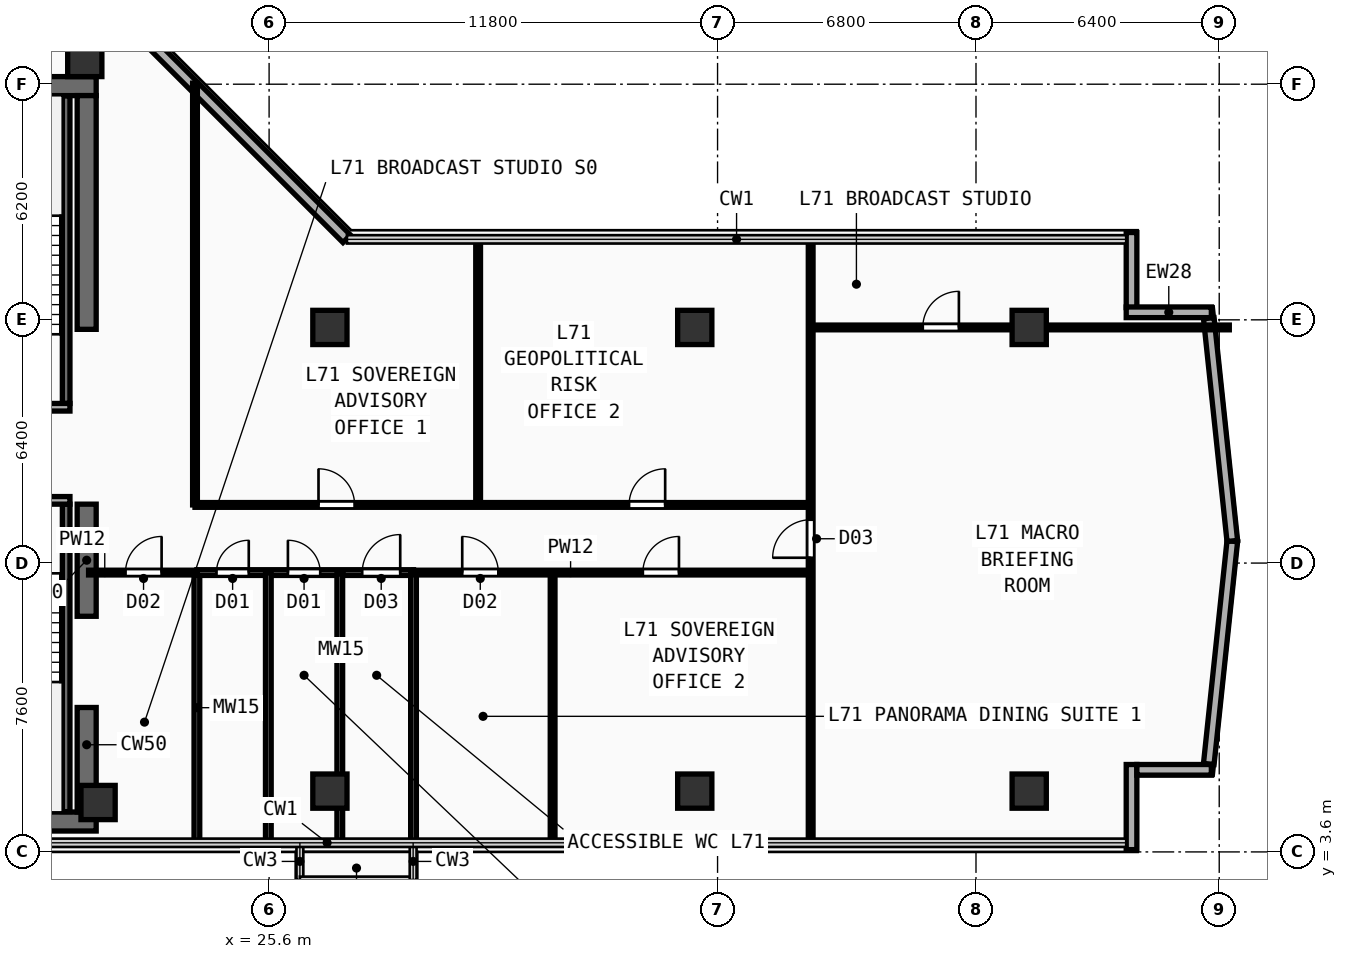
"""IFC4 building model, lengths in metres.
Left out: names, types, materials, properties, quantities, classifications, styles, units other than length and angle.
Written with IfcOpenShell. Run it as: python <this file> out.ifc"""

import sys

from ifc_helpers import new_model, si_unit, direction, frame, frame_2d, origin, origin_2d, place, context, subcontext, project, spatial, rectangle, extrude, element, fill, save


model = new_model("IFC4")
c1 = context("Model", 3, precision=1e-05, world=origin(), true_north=direction((0.0, 1.0)))
c2 = subcontext(c1, "Body", "Model", "MODEL_VIEW")
j1 = project(units=[si_unit("LENGTHUNIT", "METRE"), si_unit("PLANEANGLEUNIT", "RADIAN")], contexts=[c1])
p1 = place(None, origin())
s1 = spatial("IfcSite", under=j1, at=p1, CompositionType="ELEMENT")
p2 = place(p1, origin())
s2 = spatial("IfcBuilding", under=s1, at=p2, CompositionType="ELEMENT")
p3 = place(p2, frame((0.0, 0.0, 278.0)))
s3 = spatial("IfcBuildingStorey", under=s2, at=p3, CompositionType="ELEMENT", Elevation=278.0)
for number, where, z_axis, x_axis in (
    (1, (7.2, 4.4, 0.0), (0.0, 0.0, 1.0), (1.0, 0.0, 0.0)),
    (2, (7.2, 23.75, 0.0), (0.0, 0.0, 1.0), (1.0, 0.0, 0.0)),
):
    element("IfcWall", number, at=place(p3, frame(where, z_axis=z_axis, x_axis=x_axis)), inside=s3, PredefinedType="SHEAR", context=c2, shape_type="SweptSolid", body=[
        extrude(rectangle(XDim=13.85, YDim=0.5, at=frame_2d((6.925, 0.0))), origin(), (0.0, 0.0, 1.0), 3.56),
    ])
p4 = place(p3, frame((20.8, 4.65, 0.0), z_axis=(0.0, 0.0, 1.0), x_axis=(0.0, 1.0, 0.0)))
e3 = element("IfcWall", 3, at=p4, inside=s3, PredefinedType="SHEAR", context=c2, shape_type="SweptSolid", body=[
    extrude(rectangle(XDim=2.75, YDim=0.5, at=frame_2d((1.375, 0.0))), origin(), (0.0, 0.0, 1.0), 3.56),
])
p5 = place(p3, frame((20.8, 9.8, 0.0), z_axis=(0.0, 0.0, 1.0), x_axis=(0.0, 1.0, 0.0)))
e4 = element("IfcWall", 4, at=p5, inside=s3, PredefinedType="SHEAR", context=c2, shape_type="SweptSolid", body=[
    extrude(rectangle(XDim=2.95, YDim=0.5, at=frame_2d((1.475, 0.0))), origin(), (0.0, 0.0, 1.0), 3.56),
])
p6 = place(p3, frame((20.8, 17.35, 0.0), z_axis=(0.0, 0.0, 1.0), x_axis=(0.0, 1.0, 0.0)))
e5 = element("IfcWall", 5, at=p6, inside=s3, PredefinedType="SHEAR", context=c2, shape_type="SweptSolid", body=[
    extrude(rectangle(XDim=6.15, YDim=0.5, at=frame_2d((3.075, 0.0))), origin(), (0.0, 0.0, 1.0), 3.56),
])
for number, where, z_axis, x_axis in (
    (6, (21.1, 4.9, 0.0), (0.0, 0.0, 1.0), (1.0, 0.0, 0.0)),
    (7, (20.75, 24.45, 0.0), (0.0, 0.0, 1.0), (1.0, 0.0, 0.0)),
    (8, (27.2, 5.2, 0.0), (0.0, 0.0, 1.0), (1.0, 0.0, 0.0)),
    (9, (36.8, 5.2, 0.0), (0.0, 0.0, 1.0), (1.0, 0.0, 0.0)),
    (10, (45.6, 5.2, 0.0), (0.0, 0.0, 1.0), (1.0, 0.0, 0.0)),
    (11, (27.2, 17.4, 0.0), (0.0, 0.0, 1.0), (1.0, 0.0, 0.0)),
    (12, (36.8, 17.4, 0.0), (0.0, 0.0, 1.0), (1.0, 0.0, 0.0)),
    (13, (45.6, 17.4, 0.0), (0.0, 0.0, 1.0), (1.0, 0.0, 0.0)),
):
    element("IfcColumn", number, at=place(p3, frame(where, z_axis=z_axis, x_axis=x_axis)), inside=s3, PredefinedType="COLUMN", context=c2, shape_type="SweptSolid", body=[
        extrude(rectangle(XDim=0.9, YDim=0.9, at=origin_2d()), origin(), (0.0, 0.0, 1.0), 3.56),
    ])
p7 = place(p3, frame((48.292, 3.66, 0.0), z_axis=(0.0, 0.0, 1.0), x_axis=(0.0, 1.0, 0.0)))
e14 = element("IfcWall", 14, at=p7, inside=s3, PredefinedType="SOLIDWALL", context=c2, shape_type="SweptSolid", body=[
    extrude(rectangle(XDim=2.24, YDim=0.28, at=frame_2d((1.12, 0.0))), origin(), (0.0, 0.0, 1.0), 3.56),
])
p8 = place(p3, frame((48.433, 5.76, 0.0), z_axis=(0.0, 0.0, 1.0), x_axis=(1.0, 0.0, 0.0)))
e15 = element("IfcWall", 15, at=p8, inside=s3, PredefinedType="SOLIDWALL", context=c2, shape_type="SweptSolid", body=[
    extrude(rectangle(XDim=1.96, YDim=0.28, at=frame_2d((0.98, 0.0))), origin(), (0.0, 0.0, 1.0), 3.56),
])
p9 = place(p3, frame((48.292, 17.923, 0.0), z_axis=(0.0, 0.0, 1.0), x_axis=(0.0, 1.0, 0.0)))
e16 = element("IfcWall", 16, at=p9, inside=s3, PredefinedType="SOLIDWALL", context=c2, shape_type="SweptSolid", body=[
    extrude(rectangle(XDim=1.975, YDim=0.28, at=frame_2d((0.988, 0.0))), origin(), (0.0, 0.0, 1.0), 3.56),
])
p10 = place(p3, frame((48.153, 17.798, 0.0), z_axis=(0.0, 0.0, 1.0), x_axis=(1.0, 0.0, 0.0)))
e17 = element("IfcWall", 17, at=p10, inside=s3, PredefinedType="SOLIDWALL", context=c2, shape_type="SweptSolid", body=[
    extrude(rectangle(XDim=2.24, YDim=0.28, at=frame_2d((1.12, 0.0))), origin(), (0.0, 0.0, 1.0), 3.56),
])
p11 = place(p3, frame((27.643, 19.733, 0.0), z_axis=(0.0, 0.0, 1.0), x_axis=(-0.707106781187, 0.707106781187, 0.0)))
e18 = element("IfcWall", 18, at=p11, inside=s3, PredefinedType="SOLIDWALL", context=c2, shape_type="SweptSolid", body=[
    extrude(rectangle(XDim=9.207, YDim=0.28, at=frame_2d((4.603, 0.0))), origin(), (0.0, 0.0, 1.0), 3.56),
])
for number, where, z_axis, x_axis in (
    (19, (50.325, 5.915, 0.0), (0.0, 0.0, 1.0), (0.105, 0.994, 0.0)),
    (20, (50.944, 11.782, 0.0), (0.0, 0.0, 1.0), (-0.105, 0.994, 0.0)),
):
    element("IfcWall", number, at=place(p3, frame(where, z_axis=z_axis, x_axis=x_axis)), inside=s3, PredefinedType="SOLIDWALL", context=c2, shape_type="SweptSolid", body=[
        extrude(rectangle(XDim=5.894, YDim=0.28, at=frame_2d((2.947, 0.0))), origin(), (0.0, 0.0, 1.0), 3.56),
    ])
p12 = place(p3, frame((20.26, 4.66, 0.0), z_axis=(0.0, 0.0, 1.0), x_axis=(0.0, 1.0, 0.0)))
e21 = element("IfcWall", 21, at=p12, inside=s3, PredefinedType="SHEAR", context=c2, shape_type="SweptSolid", body=[
    extrude(rectangle(XDim=8.09, YDim=0.2, at=frame_2d((4.045, 0.0))), origin(), (0.0, 0.0, 1.0), 3.56),
])
p13 = place(p3, frame((16.4, 12.85, 0.0), z_axis=(0.0, 0.0, 1.0), x_axis=(1.0, 0.0, 0.0)))
e22 = element("IfcWall", 22, at=p13, inside=s3, PredefinedType="PARTITIONING", context=c2, shape_type="SweptSolid", body=[
    extrude(rectangle(XDim=3.96, YDim=0.2, at=frame_2d((1.98, 0.0))), origin(), (0.0, 0.0, 1.0), 3.56),
])
p14 = place(p13, frame((1.304, 0.0, 0.0)))
e23 = element("IfcOpeningElement", 23, at=p14, cuts=e22, PredefinedType="OPENING", context=c2, shape_type="SweptSolid", body=[
    extrude(rectangle(XDim=1.1, YDim=2.2, at=frame_2d((0.55, 1.1))), frame((0.0, 0.11, 0.0), z_axis=(0.0, -1.0, 0.0), x_axis=(1.0, 0.0, 0.0)), (0.0, 0.0, 1.0), 0.22),
])
p15 = place(p3, frame((20.26, 15.4, 0.0), z_axis=(0.0, 0.0, 1.0), x_axis=(0.0, 1.0, 0.0)))
e24 = element("IfcWall", 24, at=p15, inside=s3, PredefinedType="SHEAR", context=c2, shape_type="SweptSolid", body=[
    extrude(rectangle(XDim=8.09, YDim=0.2, at=frame_2d((4.045, 0.0))), origin(), (0.0, 0.0, 1.0), 3.56),
])
p16 = place(p3, frame((16.41, 15.3, 0.0), z_axis=(0.0, 0.0, 1.0), x_axis=(1.0, 0.0, 0.0)))
e25 = element("IfcWall", 25, at=p16, inside=s3, PredefinedType="PARTITIONING", context=c2, shape_type="SweptSolid", body=[
    extrude(rectangle(XDim=3.95, YDim=0.2, at=frame_2d((1.975, 0.0))), origin(), (0.0, 0.0, 1.0), 3.56),
])
p17 = place(p16, frame((1.294, 0.0, 0.0)))
e26 = element("IfcOpeningElement", 26, at=p17, cuts=e25, PredefinedType="OPENING", context=c2, shape_type="SweptSolid", body=[
    extrude(rectangle(XDim=1.1, YDim=2.2, at=frame_2d((0.55, 1.1))), frame((0.0, 0.11, 0.0), z_axis=(0.0, -1.0, 0.0), x_axis=(1.0, 0.0, 0.0)), (0.0, 0.0, 1.0), 0.22),
])
p18 = place(p3, frame((23.7, 3.84, 0.0), z_axis=(0.0, 0.0, 1.0), x_axis=(0.0, 1.0, 0.0)))
e27 = element("IfcWall", 27, at=p18, inside=s3, PredefinedType="PLUMBINGWALL", context=c2, shape_type="SweptSolid", body=[
    extrude(rectangle(XDim=7.11, YDim=0.15, at=frame_2d((3.555, 0.0))), origin(), (0.0, 0.0, 1.0), 3.56),
])
p19 = place(p3, frame((23.7, 10.95, 0.0), z_axis=(0.0, 0.0, 1.0), x_axis=(1.0, 0.0, 0.0)))
e28 = element("IfcWall", 28, at=p19, inside=s3, PredefinedType="PLUMBINGWALL", context=c2, shape_type="SweptSolid", body=[
    extrude(rectangle(XDim=5.7, YDim=0.15, at=frame_2d((2.85, 0.0))), origin(), (0.0, 0.0, 1.0), 3.56),
])
p20 = place(p19, frame((0.515, 0.0, 0.0)))
e29 = element("IfcOpeningElement", 29, at=p20, cuts=e28, PredefinedType="OPENING", context=c2, shape_type="SweptSolid", body=[
    extrude(rectangle(XDim=0.85, YDim=2.15, at=frame_2d((0.425, 1.075))), frame((0.0, 0.085, 0.0), z_axis=(0.0, -1.0, 0.0), x_axis=(1.0, 0.0, 0.0)), (0.0, 0.0, 1.0), 0.17),
])
p21 = place(p19, frame((2.395, 0.0, 0.0)))
e30 = element("IfcOpeningElement", 30, at=p21, cuts=e28, PredefinedType="OPENING", context=c2, shape_type="SweptSolid", body=[
    extrude(rectangle(XDim=0.85, YDim=2.15, at=frame_2d((0.425, 1.075))), frame((0.0, 0.085, 0.0), z_axis=(0.0, -1.0, 0.0), x_axis=(1.0, 0.0, 0.0)), (0.0, 0.0, 1.0), 0.17),
])
p22 = place(p19, frame((4.35, 0.0, 0.0)))
e31 = element("IfcOpeningElement", 31, at=p22, cuts=e28, PredefinedType="OPENING", context=c2, shape_type="SweptSolid", body=[
    extrude(rectangle(XDim=1.0, YDim=2.2, at=frame_2d((0.5, 1.1))), frame((0.0, 0.085, 0.0), z_axis=(0.0, -1.0, 0.0), x_axis=(1.0, 0.0, 0.0)), (0.0, 0.0, 1.0), 0.17),
])
p23 = place(p3, frame((25.58, 3.84, 0.0), z_axis=(0.0, 0.0, 1.0), x_axis=(0.0, 1.0, 0.0)))
e32 = element("IfcWall", 32, at=p23, inside=s3, PredefinedType="PLUMBINGWALL", context=c2, shape_type="SweptSolid", body=[
    extrude(rectangle(XDim=7.11, YDim=0.15, at=frame_2d((3.555, 0.0))), origin(), (0.0, 0.0, 1.0), 3.56),
])
p24 = place(p3, frame((27.46, 3.84, 0.0), z_axis=(0.0, 0.0, 1.0), x_axis=(0.0, 1.0, 0.0)))
e33 = element("IfcWall", 33, at=p24, inside=s3, PredefinedType="PLUMBINGWALL", context=c2, shape_type="SweptSolid", body=[
    extrude(rectangle(XDim=7.11, YDim=0.15, at=frame_2d((3.555, 0.0))), origin(), (0.0, 0.0, 1.0), 2.798),
])
p25 = place(p3, frame((29.4, 3.84, 0.0), z_axis=(0.0, 0.0, 1.0), x_axis=(0.0, 1.0, 0.0)))
e34 = element("IfcWall", 34, at=p25, inside=s3, PredefinedType="PLUMBINGWALL", context=c2, shape_type="SweptSolid", body=[
    extrude(rectangle(XDim=7.11, YDim=0.15, at=frame_2d((3.555, 0.0))), origin(), (0.0, 0.0, 1.0), 3.56),
])
p26 = place(p3, frame((20.85, 10.95, 0.0), z_axis=(0.0, 0.0, 1.0), x_axis=(1.0, 0.0, 0.0)))
e35 = element("IfcWall", 35, at=p26, inside=s3, PredefinedType="PARTITIONING", context=c2, shape_type="SweptSolid", body=[
    extrude(rectangle(XDim=2.85, YDim=0.125, at=frame_2d((1.425, 0.0))), origin(), (0.0, 0.0, 1.0), 3.56),
])
p27 = place(p26, frame((0.971, 0.0, 0.0)))
e36 = element("IfcOpeningElement", 36, at=p27, cuts=e35, PredefinedType="OPENING", context=c2, shape_type="SweptSolid", body=[
    extrude(rectangle(XDim=0.95, YDim=2.15, at=frame_2d((0.475, 1.075))), frame((0.0, 0.073, 0.0), z_axis=(0.0, -1.0, 0.0), x_axis=(1.0, 0.0, 0.0)), (0.0, 0.0, 1.0), 0.145),
])
p28 = place(p3, frame((29.4, 10.95, 0.0), z_axis=(0.0, 0.0, 1.0), x_axis=(1.0, 0.0, 0.0)))
e37 = element("IfcWall", 37, at=p28, inside=s3, PredefinedType="PARTITIONING", context=c2, shape_type="SweptSolid", body=[
    extrude(rectangle(XDim=10.45, YDim=0.125, at=frame_2d((5.225, 0.0))), origin(), (0.0, 0.0, 1.0), 3.56),
])
p29 = place(p28, frame((1.281, 0.0, 0.0)))
e38 = element("IfcOpeningElement", 38, at=p29, cuts=e37, PredefinedType="OPENING", context=c2, shape_type="SweptSolid", body=[
    extrude(rectangle(XDim=0.95, YDim=2.15, at=frame_2d((0.475, 1.075))), frame((0.0, 0.073, 0.0), z_axis=(0.0, -1.0, 0.0), x_axis=(1.0, 0.0, 0.0)), (0.0, 0.0, 1.0), 0.145),
])
p30 = place(p28, frame((6.034, 0.0, 0.0)))
e39 = element("IfcOpeningElement", 39, at=p30, cuts=e37, PredefinedType="OPENING", context=c2, shape_type="SweptSolid", body=[
    extrude(rectangle(XDim=0.95, YDim=2.15, at=frame_2d((0.475, 1.075))), frame((0.0, 0.073, 0.0), z_axis=(0.0, -1.0, 0.0), x_axis=(1.0, 0.0, 0.0)), (0.0, 0.0, 1.0), 0.145),
])
p31 = place(p3, frame((33.06, 3.84, 0.0), z_axis=(0.0, 0.0, 1.0), x_axis=(0.0, 1.0, 0.0)))
e40 = element("IfcWall", 40, at=p31, inside=s3, PredefinedType="PARTITIONING", context=c2, shape_type="SweptSolid", body=[
    extrude(rectangle(XDim=7.11, YDim=0.125, at=frame_2d((3.555, 0.0))), origin(), (0.0, 0.0, 1.0), 3.56),
])
p32 = place(p3, frame((39.85, 3.84, 0.0), z_axis=(0.0, 0.0, 1.0), x_axis=(0.0, 1.0, 0.0)))
e41 = element("IfcWall", 41, at=p32, inside=s3, PredefinedType="PARTITIONING", context=c2, shape_type="SweptSolid", body=[
    extrude(rectangle(XDim=15.92, YDim=0.125, at=frame_2d((7.96, 0.0))), origin(), (0.0, 0.0, 1.0), 3.56),
])
p33 = place(p32, frame((7.5, 0.0, 0.0)))
e42 = element("IfcOpeningElement", 42, at=p33, cuts=e41, PredefinedType="OPENING", context=c2, shape_type="SweptSolid", body=[
    extrude(rectangle(XDim=1.0, YDim=2.2, at=frame_2d((0.5, 1.1))), frame((0.0, 0.073, 0.0), z_axis=(0.0, -1.0, 0.0), x_axis=(1.0, 0.0, 0.0)), (0.0, 0.0, 1.0), 0.145),
])
p34 = place(p3, frame((39.85, 17.4, 0.0), z_axis=(0.0, 0.0, 1.0), x_axis=(1.0, 0.0, 0.0)))
e43 = element("IfcWall", 43, at=p34, inside=s3, PredefinedType="PARTITIONING", context=c2, shape_type="SweptSolid", body=[
    extrude(rectangle(XDim=11.015, YDim=0.125, at=frame_2d((5.508, 0.0))), origin(), (0.0, 0.0, 1.0), 3.2),
])
p35 = place(p34, frame((2.95, 0.0, 0.0)))
e44 = element("IfcOpeningElement", 44, at=p35, cuts=e43, PredefinedType="OPENING", context=c2, shape_type="SweptSolid", body=[
    extrude(rectangle(XDim=0.95, YDim=2.15, at=frame_2d((0.475, 1.075))), frame((0.0, 0.073, 0.0), z_axis=(0.0, -1.0, 0.0), x_axis=(1.0, 0.0, 0.0)), (0.0, 0.0, 1.0), 0.145),
])
p36 = place(p3, frame((23.65, 12.73, 0.0), z_axis=(0.0, 0.0, 1.0), x_axis=(0.0, 1.0, 0.0)))
e45 = element("IfcWall", 45, at=p36, inside=s3, PredefinedType="PARTITIONING", context=c2, shape_type="SweptSolid", body=[
    extrude(rectangle(XDim=11.096, YDim=0.125, at=frame_2d((5.548, 0.0))), origin(), (0.0, 0.0, 1.0), 3.56),
])
p37 = place(p3, frame((23.65, 12.73, 0.0), z_axis=(0.0, 0.0, 1.0), x_axis=(1.0, 0.0, 0.0)))
e46 = element("IfcWall", 46, at=p37, inside=s3, PredefinedType="PARTITIONING", context=c2, shape_type="SweptSolid", body=[
    extrude(rectangle(XDim=16.2, YDim=0.125, at=frame_2d((8.1, 0.0))), origin(), (0.0, 0.0, 1.0), 3.56),
])
p38 = place(p37, frame((3.25, 0.0, 0.0)))
e47 = element("IfcOpeningElement", 47, at=p38, cuts=e46, PredefinedType="OPENING", context=c2, shape_type="SweptSolid", body=[
    extrude(rectangle(XDim=0.95, YDim=2.15, at=frame_2d((0.475, 1.075))), frame((0.0, 0.073, 0.0), z_axis=(0.0, -1.0, 0.0), x_axis=(1.0, 0.0, 0.0)), (0.0, 0.0, 1.0), 0.145),
])
p39 = place(p37, frame((11.421, 0.0, 0.0)))
e48 = element("IfcOpeningElement", 48, at=p39, cuts=e46, PredefinedType="OPENING", context=c2, shape_type="SweptSolid", body=[
    extrude(rectangle(XDim=0.95, YDim=2.15, at=frame_2d((0.475, 1.075))), frame((0.0, 0.073, 0.0), z_axis=(0.0, -1.0, 0.0), x_axis=(1.0, 0.0, 0.0)), (0.0, 0.0, 1.0), 0.145),
])
p40 = place(p3, frame((31.1, 12.73, 0.0), z_axis=(0.0, 0.0, 1.0), x_axis=(0.0, 1.0, 0.0)))
e49 = element("IfcWall", 49, at=p40, inside=s3, PredefinedType="PARTITIONING", context=c2, shape_type="SweptSolid", body=[
    extrude(rectangle(XDim=7.03, YDim=0.125, at=frame_2d((3.515, 0.0))), origin(), (0.0, 0.0, 1.0), 3.56),
])
p41 = place(p20, origin())
e50 = element("IfcDoor", 50, at=p41, inside=s3, OperationType="SINGLE_SWING_RIGHT", PredefinedType="DOOR", context=c2, shape_type="SweptSolid", body=[
    extrude(rectangle(XDim=0.85, YDim=2.15, at=frame_2d((0.425, 1.075))), frame((0.0, 0.025, 0.0), z_axis=(0.0, -1.0, 0.0), x_axis=(1.0, 0.0, 0.0)), (0.0, 0.0, 1.0), 0.05),
])
fill(e29, e50)
p42 = place(p21, origin())
e51 = element("IfcDoor", 51, at=p42, inside=s3, OperationType="SINGLE_SWING_LEFT", PredefinedType="DOOR", context=c2, shape_type="SweptSolid", body=[
    extrude(rectangle(XDim=0.85, YDim=2.15, at=frame_2d((0.425, 1.075))), frame((0.0, 0.025, 0.0), z_axis=(0.0, -1.0, 0.0), x_axis=(1.0, 0.0, 0.0)), (0.0, 0.0, 1.0), 0.05),
])
fill(e30, e51)
p43 = place(p22, origin())
e52 = element("IfcDoor", 52, at=p43, inside=s3, OperationType="SINGLE_SWING_RIGHT", PredefinedType="DOOR", context=c2, shape_type="SweptSolid", body=[
    extrude(rectangle(XDim=1.0, YDim=2.2, at=frame_2d((0.5, 1.1))), frame((0.0, 0.025, 0.0), z_axis=(0.0, -1.0, 0.0), x_axis=(1.0, 0.0, 0.0)), (0.0, 0.0, 1.0), 0.05),
])
fill(e31, e52)
p44 = place(p27, origin())
e53 = element("IfcDoor", 53, at=p44, inside=s3, OperationType="SINGLE_SWING_RIGHT", PredefinedType="DOOR", context=c2, shape_type="SweptSolid", body=[
    extrude(rectangle(XDim=0.95, YDim=2.15, at=frame_2d((0.475, 1.075))), frame((0.0, 0.025, 0.0), z_axis=(0.0, -1.0, 0.0), x_axis=(1.0, 0.0, 0.0)), (0.0, 0.0, 1.0), 0.05),
])
fill(e36, e53)
p45 = place(p29, origin())
e54 = element("IfcDoor", 54, at=p45, inside=s3, OperationType="SINGLE_SWING_LEFT", PredefinedType="DOOR", context=c2, shape_type="SweptSolid", body=[
    extrude(rectangle(XDim=0.95, YDim=2.15, at=frame_2d((0.475, 1.075))), frame((0.0, 0.025, 0.0), z_axis=(0.0, -1.0, 0.0), x_axis=(1.0, 0.0, 0.0)), (0.0, 0.0, 1.0), 0.05),
])
fill(e38, e54)
p46 = place(p30, origin())
e55 = element("IfcDoor", 55, at=p46, inside=s3, OperationType="SINGLE_SWING_RIGHT", PredefinedType="DOOR", context=c2, shape_type="SweptSolid", body=[
    extrude(rectangle(XDim=0.95, YDim=2.15, at=frame_2d((0.475, 1.075))), frame((0.0, 0.025, 0.0), z_axis=(0.0, -1.0, 0.0), x_axis=(1.0, 0.0, 0.0)), (0.0, 0.0, 1.0), 0.05),
])
fill(e39, e55)
p47 = place(p33, origin())
e56 = element("IfcDoor", 56, at=p47, inside=s3, OperationType="SINGLE_SWING_LEFT", PredefinedType="DOOR", context=c2, shape_type="SweptSolid", body=[
    extrude(rectangle(XDim=1.0, YDim=2.2, at=frame_2d((0.5, 1.1))), frame((0.0, 0.025, 0.0), z_axis=(0.0, -1.0, 0.0), x_axis=(1.0, 0.0, 0.0)), (0.0, 0.0, 1.0), 0.05),
])
fill(e42, e56)
p48 = place(p35, origin())
e57 = element("IfcDoor", 57, at=p48, inside=s3, OperationType="SINGLE_SWING_RIGHT", PredefinedType="DOOR", context=c2, shape_type="SweptSolid", body=[
    extrude(rectangle(XDim=0.95, YDim=2.15, at=frame_2d((0.475, 1.075))), frame((0.0, 0.025, 0.0), z_axis=(0.0, -1.0, 0.0), x_axis=(1.0, 0.0, 0.0)), (0.0, 0.0, 1.0), 0.05),
])
fill(e44, e57)
p49 = place(p38, origin())
e58 = element("IfcDoor", 58, at=p49, inside=s3, OperationType="SINGLE_SWING_LEFT", PredefinedType="DOOR", context=c2, shape_type="SweptSolid", body=[
    extrude(rectangle(XDim=0.95, YDim=2.15, at=frame_2d((0.475, 1.075))), frame((0.0, 0.025, 0.0), z_axis=(0.0, -1.0, 0.0), x_axis=(1.0, 0.0, 0.0)), (0.0, 0.0, 1.0), 0.05),
])
fill(e47, e58)
p50 = place(p39, origin())
e59 = element("IfcDoor", 59, at=p50, inside=s3, OperationType="SINGLE_SWING_RIGHT", PredefinedType="DOOR", context=c2, shape_type="SweptSolid", body=[
    extrude(rectangle(XDim=0.95, YDim=2.15, at=frame_2d((0.475, 1.075))), frame((0.0, 0.025, 0.0), z_axis=(0.0, -1.0, 0.0), x_axis=(1.0, 0.0, 0.0)), (0.0, 0.0, 1.0), 0.05),
])
fill(e48, e59)
save(model, sys.argv[1])
